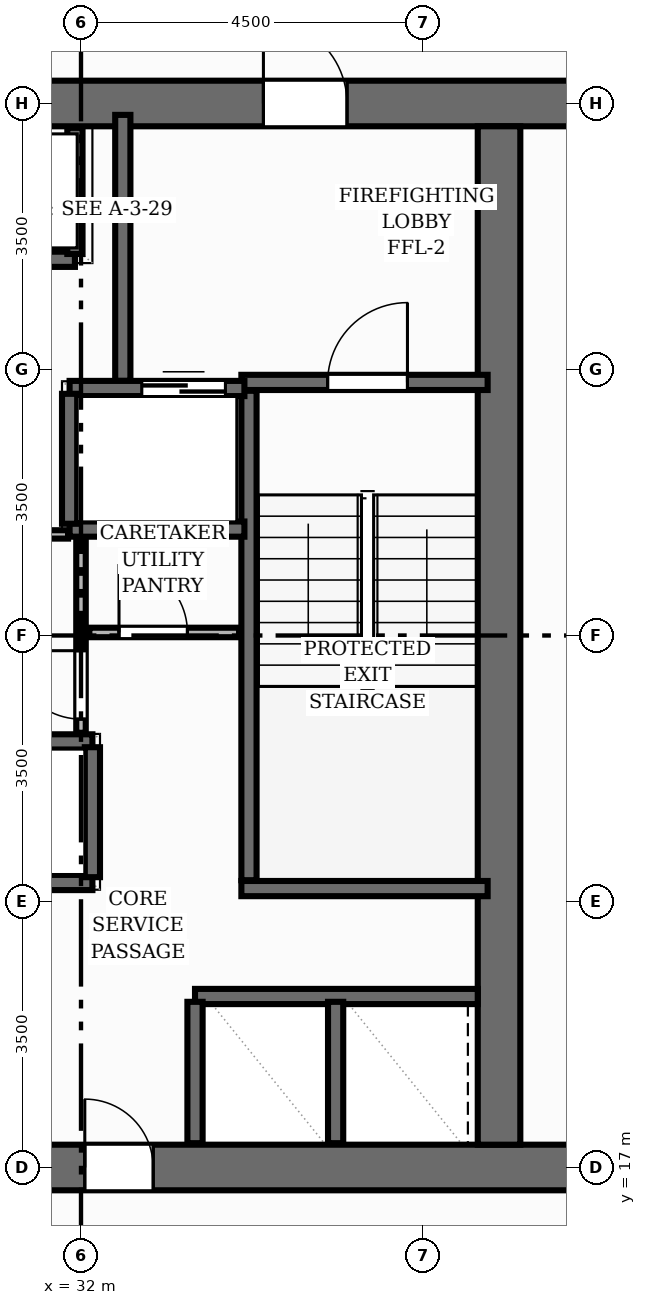
"""IFC4 building model, lengths in metres.
Left out: names, types, materials, properties, quantities, classifications, styles, units other than length and angle.
Written with IfcOpenShell. Run it as: python <this file> out.ifc"""

import sys

from ifc_helpers import new_model, si_unit, direction, frame, frame_2d, origin, place, context, subcontext, project, spatial, rectangle, extrude, element, fill, save


model = new_model("IFC4")
c1 = context("Model", 3, precision=1e-05, world=origin(), true_north=direction((0.0, 1.0)))
c2 = subcontext(c1, "Body", "Model", "MODEL_VIEW")
j1 = project(units=[si_unit("LENGTHUNIT", "METRE"), si_unit("PLANEANGLEUNIT", "RADIAN")], contexts=[c1])
p1 = place(None, origin())
s1 = spatial("IfcSite", under=j1, at=p1, CompositionType="ELEMENT")
p2 = place(p1, origin())
s2 = spatial("IfcBuilding", under=s1, at=p2, CompositionType="ELEMENT")
p3 = place(p2, frame((0.0, 0.0, 116.96)))
s3 = spatial("IfcBuildingStorey", under=s2, at=p3, CompositionType="ELEMENT", Elevation=116.96)
p4 = place(p3, frame((22.7, 17.0, 0.0), z_axis=(0.0, 0.0, 1.0), x_axis=(1.0, 0.0, 0.0)))
e1 = element("IfcWall", 1, at=p4, inside=s3, PredefinedType="SHEAR", context=c2, shape_type="SweptSolid", body=[
    extrude(rectangle(XDim=18.6, YDim=0.6, at=frame_2d((9.3, 0.0))), origin(), (0.0, 0.0, 1.0), 3.2),
])
p5 = place(p4, frame((5.8, 0.0, 0.0)))
e2 = element("IfcOpeningElement", 2, at=p5, cuts=e1, PredefinedType="OPENING", context=c2, shape_type="SweptSolid", body=[
    extrude(rectangle(XDim=1.1, YDim=2.15, at=frame_2d((0.55, 1.075))), frame((0.0, 0.31, 0.0), z_axis=(0.0, -1.0, 0.0), x_axis=(1.0, 0.0, 0.0)), (0.0, 0.0, 1.0), 0.62),
])
p6 = place(p4, frame((9.35, 0.0, 0.0)))
e3 = element("IfcOpeningElement", 3, at=p6, cuts=e1, PredefinedType="OPENING", context=c2, shape_type="SweptSolid", body=[
    extrude(rectangle(XDim=0.9, YDim=2.1, at=frame_2d((0.45, 1.05))), frame((0.0, 0.31, 0.0), z_axis=(0.0, -1.0, 0.0), x_axis=(1.0, 0.0, 0.0)), (0.0, 0.0, 1.0), 0.62),
])
p7 = place(p3, frame((22.7, 31.0, 0.0), z_axis=(0.0, 0.0, 1.0), x_axis=(1.0, 0.0, 0.0)))
e4 = element("IfcWall", 4, at=p7, inside=s3, PredefinedType="SHEAR", context=c2, shape_type="SweptSolid", body=[
    extrude(rectangle(XDim=18.6, YDim=0.6, at=frame_2d((9.3, 0.0))), origin(), (0.0, 0.0, 1.0), 3.2),
])
p8 = place(p7, frame((11.7, 0.0, 0.0)))
e5 = element("IfcOpeningElement", 5, at=p8, cuts=e4, PredefinedType="OPENING", context=c2, shape_type="SweptSolid", body=[
    extrude(rectangle(XDim=1.1, YDim=2.15, at=frame_2d((0.55, 1.075))), frame((0.0, 0.31, 0.0), z_axis=(0.0, -1.0, 0.0), x_axis=(1.0, 0.0, 0.0)), (0.0, 0.0, 1.0), 0.62),
])
p9 = place(p7, frame((4.325, 0.0, 0.0)))
e6 = element("IfcOpeningElement", 6, at=p9, cuts=e4, PredefinedType="OPENING", context=c2, shape_type="SweptSolid", body=[
    extrude(rectangle(XDim=1.05, YDim=2.15, at=frame_2d((0.525, 1.075))), frame((0.0, 0.31, 0.0), z_axis=(0.0, -1.0, 0.0), x_axis=(1.0, 0.0, 0.0)), (0.0, 0.0, 1.0), 0.62),
])
p10 = place(p7, frame((6.075, 0.0, 0.0)))
e7 = element("IfcOpeningElement", 7, at=p10, cuts=e4, PredefinedType="OPENING", context=c2, shape_type="SweptSolid", body=[
    extrude(rectangle(XDim=1.05, YDim=2.15, at=frame_2d((0.525, 1.075))), frame((0.0, 0.31, 0.0), z_axis=(0.0, -1.0, 0.0), x_axis=(1.0, 0.0, 0.0)), (0.0, 0.0, 1.0), 0.62),
])
p11 = place(p7, frame((7.825, 0.0, 0.0)))
e8 = element("IfcOpeningElement", 8, at=p11, cuts=e4, PredefinedType="OPENING", context=c2, shape_type="SweptSolid", body=[
    extrude(rectangle(XDim=1.05, YDim=2.15, at=frame_2d((0.525, 1.075))), frame((0.0, 0.31, 0.0), z_axis=(0.0, -1.0, 0.0), x_axis=(1.0, 0.0, 0.0)), (0.0, 0.0, 1.0), 0.62),
])
p12 = place(p3, frame((37.5, 17.3, 0.0), z_axis=(0.0, 0.0, 1.0), x_axis=(0.0, 1.0, 0.0)))
e9 = element("IfcWall", 9, at=p12, inside=s3, PredefinedType="SHEAR", context=c2, shape_type="SweptSolid", body=[
    extrude(rectangle(XDim=13.4, YDim=0.56, at=frame_2d((6.7, 0.0))), origin(), (0.0, 0.0, 1.0), 3.2),
])
p13 = place(p3, frame((34.21, 20.78, 0.0), z_axis=(0.0, 0.0, 1.0), x_axis=(0.0, 1.0, 0.0)))
e10 = element("IfcWall", 10, at=p13, inside=s3, PredefinedType="SHEAR", context=c2, shape_type="SweptSolid", body=[
    extrude(rectangle(XDim=6.44, YDim=0.2, at=frame_2d((3.22, 0.0))), origin(), (0.0, 0.0, 1.0), 3.2),
])
p14 = place(p3, frame((34.11, 20.67, 0.0), z_axis=(0.0, 0.0, 1.0), x_axis=(1.0, 0.0, 0.0)))
e11 = element("IfcWall", 11, at=p14, inside=s3, PredefinedType="SHEAR", context=c2, shape_type="SweptSolid", body=[
    extrude(rectangle(XDim=3.24, YDim=0.2, at=frame_2d((1.62, 0.0))), origin(), (0.0, 0.0, 1.0), 3.2),
])
p15 = place(p3, frame((34.11, 27.33, 0.0), z_axis=(0.0, 0.0, 1.0), x_axis=(1.0, 0.0, 0.0)))
e12 = element("IfcWall", 12, at=p15, inside=s3, PredefinedType="SHEAR", context=c2, shape_type="SweptSolid", body=[
    extrude(rectangle(XDim=3.24, YDim=0.2, at=frame_2d((1.62, 0.0))), origin(), (0.0, 0.0, 1.0), 3.2),
])
p16 = place(p15, frame((1.135, 0.0, 0.0)))
e13 = element("IfcOpeningElement", 13, at=p16, cuts=e12, PredefinedType="OPENING", context=c2, shape_type="SweptSolid", body=[
    extrude(rectangle(XDim=1.05, YDim=2.15, at=frame_2d((0.525, 1.075))), frame((0.0, 0.11, 0.0), z_axis=(0.0, -1.0, 0.0), x_axis=(1.0, 0.0, 0.0)), (0.0, 0.0, 1.0), 0.22),
])
p17 = place(p3, frame((32.55, 27.35, 0.0), z_axis=(0.0, 0.0, 1.0), x_axis=(0.0, 1.0, 0.0)))
e14 = element("IfcWall", 14, at=p17, inside=s3, PredefinedType="SHEAR", context=c2, shape_type="SweptSolid", body=[
    extrude(rectangle(XDim=3.5, YDim=0.2, at=frame_2d((1.75, 0.0))), origin(), (0.0, 0.0, 1.0), 3.2),
])
p18 = place(p3, frame((29.85, 20.75, 0.0), z_axis=(0.0, 0.0, 1.0), x_axis=(1.0, 0.0, 0.0)))
e15 = element("IfcWall", 15, at=p18, inside=s3, PredefinedType="SHEAR", context=c2, shape_type="SweptSolid", body=[
    extrude(rectangle(XDim=2.3, YDim=0.2, at=frame_2d((1.15, 0.0))), origin(), (0.0, 0.0, 1.0), 3.2),
])
p19 = place(p18, frame((0.25, 0.0, 0.0)))
e16 = element("IfcOpeningElement", 16, at=p19, cuts=e15, PredefinedType="OPENING", context=c2, shape_type="SweptSolid", body=[
    extrude(rectangle(XDim=1.1, YDim=2.15, at=frame_2d((0.55, 1.075))), frame((0.0, 0.11, 0.0), z_axis=(0.0, -1.0, 0.0), x_axis=(1.0, 0.0, 0.0)), (0.0, 0.0, 1.0), 0.22),
])
p20 = place(p3, frame((29.85, 22.6, 0.0), z_axis=(0.0, 0.0, 1.0), x_axis=(1.0, 0.0, 0.0)))
e17 = element("IfcWall", 17, at=p20, inside=s3, PredefinedType="SHEAR", context=c2, shape_type="SweptSolid", body=[
    extrude(rectangle(XDim=2.3, YDim=0.2, at=frame_2d((1.15, 0.0))), origin(), (0.0, 0.0, 1.0), 3.2),
])
p21 = place(p3, frame((32.15, 20.82, 0.0), z_axis=(0.0, 0.0, 1.0), x_axis=(0.0, 1.0, 0.0)))
e18 = element("IfcWall", 18, at=p21, inside=s3, PredefinedType="SHEAR", context=c2, shape_type="SweptSolid", body=[
    extrude(rectangle(XDim=1.71, YDim=0.2, at=frame_2d((0.855, 0.0))), origin(), (0.0, 0.0, 1.0), 3.2),
])
p22 = place(p3, frame((31.85, 27.25, 0.0), z_axis=(0.0, 0.0, 1.0), x_axis=(1.0, 0.0, 0.0)))
e19 = element("IfcWall", 19, at=p22, inside=s3, PredefinedType="SHEAR", context=c2, shape_type="SweptSolid", body=[
    extrude(rectangle(XDim=2.3, YDim=0.2, at=frame_2d((1.15, 0.0))), origin(), (0.0, 0.0, 1.0), 3.2),
])
p23 = place(p22, frame((0.95, 0.0, 0.0)))
e20 = element("IfcOpeningElement", 20, at=p23, cuts=e19, PredefinedType="OPENING", context=c2, shape_type="SweptSolid", body=[
    extrude(rectangle(XDim=1.1, YDim=2.15, at=frame_2d((0.55, 1.075))), frame((0.0, 0.11, 0.0), z_axis=(0.0, -1.0, 0.0), x_axis=(1.0, 0.0, 0.0)), (0.0, 0.0, 1.0), 0.22),
])
p24 = place(p3, frame((31.85, 25.4, 0.0), z_axis=(0.0, 0.0, 1.0), x_axis=(1.0, 0.0, 0.0)))
e21 = element("IfcWall", 21, at=p24, inside=s3, PredefinedType="SHEAR", context=c2, shape_type="SweptSolid", body=[
    extrude(rectangle(XDim=2.3, YDim=0.2, at=frame_2d((1.15, 0.0))), origin(), (0.0, 0.0, 1.0), 3.2),
])
p25 = place(p3, frame((31.85, 25.47, 0.0), z_axis=(0.0, 0.0, 1.0), x_axis=(0.0, 1.0, 0.0)))
e22 = element("IfcWall", 22, at=p25, inside=s3, PredefinedType="SHEAR", context=c2, shape_type="SweptSolid", body=[
    extrude(rectangle(XDim=1.71, YDim=0.2, at=frame_2d((0.855, 0.0))), origin(), (0.0, 0.0, 1.0), 3.2),
])
p26 = place(p3, frame((26.68, 28.95, 0.0), z_axis=(0.0, 0.0, 1.0), x_axis=(1.0, 0.0, 0.0)))
e23 = element("IfcWall", 23, at=p26, inside=s3, PredefinedType="SHEAR", context=c2, shape_type="SweptSolid", body=[
    extrude(rectangle(XDim=5.24, YDim=0.2, at=frame_2d((2.62, 0.0))), origin(), (0.0, 0.0, 1.0), 3.2),
])
p27 = place(p3, frame((31.92, 29.02, 0.0), z_axis=(0.0, 0.0, 1.0), x_axis=(0.0, 1.0, 0.0)))
e24 = element("IfcWall", 24, at=p27, inside=s3, PredefinedType="SHEAR", context=c2, shape_type="SweptSolid", body=[
    extrude(rectangle(XDim=1.66, YDim=0.2, at=frame_2d((0.83, 0.0))), origin(), (0.0, 0.0, 1.0), 3.2),
])
p28 = place(p3, frame((33.5, 19.25, 0.0), z_axis=(0.0, 0.0, 1.0), x_axis=(1.0, 0.0, 0.0)))
e25 = element("IfcWall", 25, at=p28, inside=s3, PredefinedType="SHEAR", context=c2, shape_type="SweptSolid", body=[
    extrude(rectangle(XDim=3.72, YDim=0.2, at=frame_2d((1.86, 0.0))), origin(), (0.0, 0.0, 1.0), 3.2),
])
for number, where, z_axis, x_axis in (
    (26, (33.5, 17.32, 0.0), (0.0, 0.0, 1.0), (0.0, 1.0, 0.0)),
    (27, (35.35, 17.32, 0.0), (0.0, 0.0, 1.0), (0.0, 1.0, 0.0)),
):
    element("IfcWall", number, at=place(p3, frame(where, z_axis=z_axis, x_axis=x_axis)), inside=s3, PredefinedType="SHEAR", context=c2, shape_type="SweptSolid", body=[
        extrude(rectangle(XDim=1.86, YDim=0.2, at=frame_2d((0.93, 0.0))), origin(), (0.0, 0.0, 1.0), 3.2),
    ])
p29 = place(p3, frame((32.0, 22.72, 0.0), z_axis=(0.0, 0.0, 1.0), x_axis=(0.0, 1.0, 0.0)))
e28 = element("IfcWall", 28, at=p29, inside=s3, PredefinedType="PARTITIONING", context=c2, shape_type="SweptSolid", body=[
    extrude(rectangle(XDim=2.52, YDim=0.125, at=frame_2d((1.26, 0.0))), origin(), (0.0, 0.0, 1.0), 2.955),
])
p30 = place(p29, frame((0.18, 0.0, 0.0)))
e29 = element("IfcOpeningElement", 29, at=p30, cuts=e28, PredefinedType="OPENING", context=c2, shape_type="SweptSolid", body=[
    extrude(rectangle(XDim=0.9, YDim=2.1, at=frame_2d((0.45, 1.05))), frame((0.0, 0.073, 0.0), z_axis=(0.0, -1.0, 0.0), x_axis=(1.0, 0.0, 0.0)), (0.0, 0.0, 1.0), 0.145),
])
p31 = place(p3, frame((32.11, 24.04, 0.0), z_axis=(0.0, 0.0, 1.0), x_axis=(1.0, 0.0, 0.0)))
e30 = element("IfcWall", 30, at=p31, inside=s3, PredefinedType="PARTITIONING", context=c2, shape_type="SweptSolid", body=[
    extrude(rectangle(XDim=1.97, YDim=0.125, at=frame_2d((0.985, 0.0))), origin(), (0.0, 0.0, 1.0), 2.955),
])
p32 = place(p31, frame((0.39, 0.0, 0.0)))
e31 = element("IfcOpeningElement", 31, at=p32, cuts=e30, PredefinedType="OPENING", context=c2, shape_type="SweptSolid", body=[
    extrude(rectangle(XDim=0.9, YDim=2.1, at=frame_2d((0.45, 1.05))), frame((0.0, 0.073, 0.0), z_axis=(0.0, -1.0, 0.0), x_axis=(1.0, 0.0, 0.0)), (0.0, 0.0, 1.0), 0.145),
])
p33 = place(p3, frame((29.89, 25.33, 0.0), z_axis=(0.0, 0.0, 1.0), x_axis=(1.0, 0.0, 0.0)))
e32 = element("IfcWall", 32, at=p33, inside=s3, PredefinedType="MOVABLE", context=c2, shape_type="SweptSolid", body=[
    extrude(rectangle(XDim=1.94, YDim=0.11, at=frame_2d((0.97, 0.0))), origin(), (0.0, 0.0, 1.0), 2.955),
])
p34 = place(p16, origin())
e33 = element("IfcDoor", 33, at=p34, inside=s3, OperationType="SINGLE_SWING_RIGHT", PredefinedType="DOOR", context=c2, shape_type="SweptSolid", body=[
    extrude(rectangle(XDim=1.05, YDim=2.15, at=frame_2d((0.525, 1.075))), frame((0.0, 0.025, 0.0), z_axis=(0.0, -1.0, 0.0), x_axis=(1.0, 0.0, 0.0)), (0.0, 0.0, 1.0), 0.05),
])
fill(e13, e33)
p35 = place(p8, origin())
e34 = element("IfcDoor", 34, at=p35, inside=s3, OperationType="SINGLE_SWING_LEFT", PredefinedType="DOOR", context=c2, shape_type="SweptSolid", body=[
    extrude(rectangle(XDim=1.1, YDim=2.15, at=frame_2d((0.55, 1.075))), frame((0.0, 0.025, 0.0), z_axis=(0.0, -1.0, 0.0), x_axis=(1.0, 0.0, 0.0)), (0.0, 0.0, 1.0), 0.05),
])
fill(e5, e34)
p36 = place(p23, origin())
e35 = element("IfcDoor", 35, at=p36, inside=s3, OperationType="DOUBLE_DOOR_SLIDING", PredefinedType="DOOR", context=c2, shape_type="SweptSolid", body=[
    extrude(rectangle(XDim=1.1, YDim=2.15, at=frame_2d((0.55, 1.075))), frame((0.0, 0.025, 0.0), z_axis=(0.0, -1.0, 0.0), x_axis=(1.0, 0.0, 0.0)), (0.0, 0.0, 1.0), 0.05),
])
fill(e20, e35)
p37 = place(p6, origin())
e36 = element("IfcDoor", 36, at=p37, inside=s3, OperationType="SINGLE_SWING_LEFT", PredefinedType="DOOR", context=c2, shape_type="SweptSolid", body=[
    extrude(rectangle(XDim=0.9, YDim=2.1, at=frame_2d((0.45, 1.05))), frame((0.0, 0.025, 0.0), z_axis=(0.0, -1.0, 0.0), x_axis=(1.0, 0.0, 0.0)), (0.0, 0.0, 1.0), 0.05),
])
fill(e3, e36)
p38 = place(p32, origin())
e37 = element("IfcDoor", 37, at=p38, inside=s3, OperationType="SINGLE_SWING_LEFT", PredefinedType="DOOR", context=c2, shape_type="SweptSolid", body=[
    extrude(rectangle(XDim=0.9, YDim=2.1, at=frame_2d((0.45, 1.05))), frame((0.0, 0.025, 0.0), z_axis=(0.0, -1.0, 0.0), x_axis=(1.0, 0.0, 0.0)), (0.0, 0.0, 1.0), 0.05),
])
fill(e31, e37)
p39 = place(p30, origin())
e38 = element("IfcDoor", 38, at=p39, inside=s3, OperationType="SINGLE_SWING_RIGHT", PredefinedType="DOOR", context=c2, shape_type="SweptSolid", body=[
    extrude(rectangle(XDim=0.9, YDim=2.1, at=frame_2d((0.45, 1.05))), frame((0.0, 0.025, 0.0), z_axis=(0.0, -1.0, 0.0), x_axis=(1.0, 0.0, 0.0)), (0.0, 0.0, 1.0), 0.05),
])
fill(e29, e38)
save(model, sys.argv[1])
